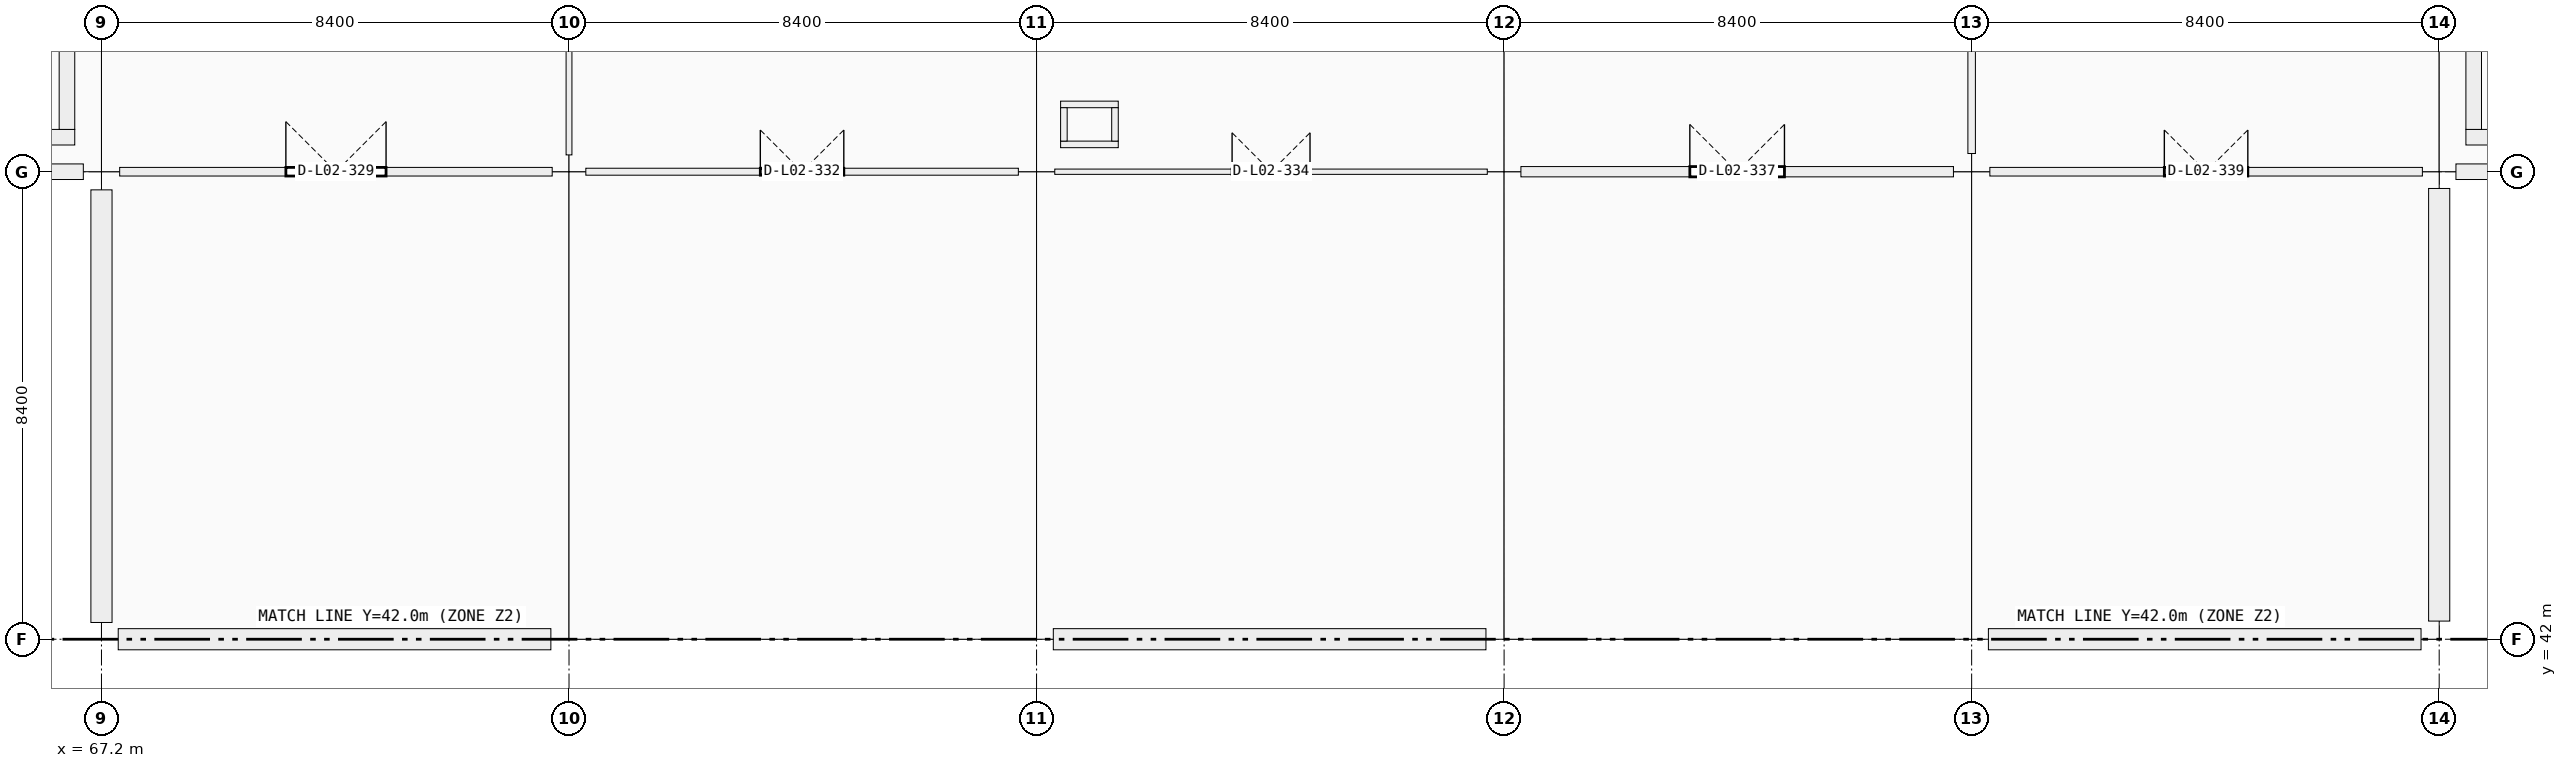
"""IFC4 building model, lengths in metres.
Left out: names, types, materials, properties, quantities, classifications, styles, units other than length and angle.
Written with IfcOpenShell. Run it as: python <this file> out.ifc"""

import sys

from ifc_helpers import new_model, si_unit, direction, frame, frame_2d, origin, origin_2d, place, context, subcontext, project, spatial, rectangle, extrude, element, fill, save


model = new_model("IFC4")
c1 = context("Model", 3, precision=1e-05, world=origin(), true_north=direction((0.0, 1.0)))
c2 = subcontext(c1, "Body", "Model", "MODEL_VIEW")
j1 = project(units=[si_unit("LENGTHUNIT", "METRE"), si_unit("PLANEANGLEUNIT", "RADIAN")], contexts=[c1])
p1 = place(None, origin())
s1 = spatial("IfcSite", under=j1, at=p1, CompositionType="ELEMENT")
p2 = place(p1, origin())
s2 = spatial("IfcBuilding", under=s1, at=p2, CompositionType="ELEMENT")
p3 = place(p2, frame((0.0, 0.0, 10.26)))
s3 = spatial("IfcBuildingStorey", under=s2, at=p3, CompositionType="ELEMENT", Elevation=10.26)
p4 = place(p3, frame((67.2, 42.0, 0.0), z_axis=(0.0, 0.0, 1.0), x_axis=(1.0, 0.0, 0.0)))
e1 = element("IfcColumn", 1, at=p4, inside=s3, PredefinedType="COLUMN", context=c2, shape_type="SweptSolid", body=[
    extrude(rectangle(XDim=0.6, YDim=0.6, at=origin_2d()), origin(), (0.0, 0.0, 1.0), 4.5),
])
for number, where, z_axis, x_axis in (
    (2, (67.2, 50.4, 0.0), (0.0, 0.0, 1.0), (1.0, 0.0, 0.0)),
    (3, (75.6, 42.0, 0.0), (0.0, 0.0, 1.0), (1.0, 0.0, 0.0)),
):
    element("IfcColumn", number, at=place(p3, frame(where, z_axis=z_axis, x_axis=x_axis)), inside=s3, PredefinedType="COLUMN", context=c2, shape_type="SweptSolid", body=[
        extrude(rectangle(XDim=0.65, YDim=0.65, at=origin_2d()), origin(), (0.0, 0.0, 1.0), 4.5),
    ])
for number, where, z_axis, x_axis in (
    (4, (75.6, 50.4, 0.0), (0.0, 0.0, 1.0), (1.0, 0.0, 0.0)),
    (5, (84.0, 42.0, 0.0), (0.0, 0.0, 1.0), (1.0, 0.0, 0.0)),
):
    element("IfcColumn", number, at=place(p3, frame(where, z_axis=z_axis, x_axis=x_axis)), inside=s3, PredefinedType="COLUMN", context=c2, shape_type="SweptSolid", body=[
        extrude(rectangle(XDim=0.6, YDim=0.6, at=origin_2d()), origin(), (0.0, 0.0, 1.0), 4.5),
    ])
for number, where, z_axis, x_axis in (
    (6, (84.0, 50.4, 0.0), (0.0, 0.0, 1.0), (1.0, 0.0, 0.0)),
    (7, (92.4, 42.0, 0.0), (0.0, 0.0, 1.0), (1.0, 0.0, 0.0)),
):
    element("IfcColumn", number, at=place(p3, frame(where, z_axis=z_axis, x_axis=x_axis)), inside=s3, PredefinedType="COLUMN", context=c2, shape_type="SweptSolid", body=[
        extrude(rectangle(XDim=0.65, YDim=0.65, at=origin_2d()), origin(), (0.0, 0.0, 1.0), 4.5),
    ])
for number, where, z_axis, x_axis in (
    (8, (92.4, 50.4, 0.0), (0.0, 0.0, 1.0), (1.0, 0.0, 0.0)),
    (9, (100.8, 42.0, 0.0), (0.0, 0.0, 1.0), (1.0, 0.0, 0.0)),
):
    element("IfcColumn", number, at=place(p3, frame(where, z_axis=z_axis, x_axis=x_axis)), inside=s3, PredefinedType="COLUMN", context=c2, shape_type="SweptSolid", body=[
        extrude(rectangle(XDim=0.6, YDim=0.6, at=origin_2d()), origin(), (0.0, 0.0, 1.0), 4.5),
    ])
for number, where, z_axis, x_axis in (
    (10, (100.8, 50.4, 0.0), (0.0, 0.0, 1.0), (1.0, 0.0, 0.0)),
    (11, (109.2, 42.0, 0.0), (0.0, 0.0, 1.0), (1.0, 0.0, 0.0)),
):
    element("IfcColumn", number, at=place(p3, frame(where, z_axis=z_axis, x_axis=x_axis)), inside=s3, PredefinedType="COLUMN", context=c2, shape_type="SweptSolid", body=[
        extrude(rectangle(XDim=0.65, YDim=0.65, at=origin_2d()), origin(), (0.0, 0.0, 1.0), 4.5),
    ])
p5 = place(p3, frame((109.2, 50.4, 0.0), z_axis=(0.0, 0.0, 1.0), x_axis=(1.0, 0.0, 0.0)))
e12 = element("IfcColumn", 12, at=p5, inside=s3, PredefinedType="COLUMN", context=c2, shape_type="SweptSolid", body=[
    extrude(rectangle(XDim=0.6, YDim=0.6, at=origin_2d()), origin(), (0.0, 0.0, 1.0), 4.5),
])
p6 = place(p3, frame((66.874, 50.4, 0.0), z_axis=(0.0, 0.0, 1.0), x_axis=(-1.0, 0.0, 0.0)))
e13 = element("IfcWall", 13, at=p6, inside=s3, PredefinedType="SOLIDWALL", context=c2, shape_type="SweptSolid", body=[
    extrude(rectangle(XDim=7.773, YDim=0.28, at=frame_2d((3.886, 0.0))), origin(), (0.0, 0.0, 1.0), 3.54),
])
p7 = place(p3, frame((75.274, 42.0, 0.0), z_axis=(0.0, 0.0, 1.0), x_axis=(-1.0, 0.0, 0.0)))
e14 = element("IfcWall", 14, at=p7, inside=s3, PredefinedType="SOLIDWALL", context=c2, shape_type="SweptSolid", body=[
    extrude(rectangle(XDim=7.773, YDim=0.38, at=frame_2d((3.886, 0.0))), origin(), (0.0, 0.0, 1.0), 3.54),
])
p8 = place(p7, frame((2.636, 0.0, 1.55)))
e15 = element("IfcOpeningElement", 15, at=p8, cuts=e14, PredefinedType="OPENING", context=c2, shape_type="SweptSolid", body=[
    extrude(rectangle(XDim=2.5, YDim=1.65, at=frame_2d((1.25, 0.825))), frame((0.0, 0.19, 0.0), z_axis=(0.0, -1.0, 0.0), x_axis=(1.0, 0.0, 0.0)), (0.0, 0.0, 1.0), 0.38),
])
p9 = place(p3, frame((67.2, 42.301, 0.0), z_axis=(0.0, 0.0, 1.0), x_axis=(0.0, 1.0, 0.0)))
e16 = element("IfcWall", 16, at=p9, inside=s3, PredefinedType="SOLIDWALL", context=c2, shape_type="SweptSolid", body=[
    extrude(rectangle(XDim=7.773, YDim=0.38, at=frame_2d((3.886, 0.0))), origin(), (0.0, 0.0, 1.0), 3.54),
])
p10 = place(p3, frame((92.074, 42.0, 0.0), z_axis=(0.0, 0.0, 1.0), x_axis=(-1.0, 0.0, 0.0)))
e17 = element("IfcWall", 17, at=p10, inside=s3, PredefinedType="SOLIDWALL", context=c2, shape_type="SweptSolid", body=[
    extrude(rectangle(XDim=7.773, YDim=0.38, at=frame_2d((3.886, 0.0))), origin(), (0.0, 0.0, 1.0), 3.54),
])
p11 = place(p10, frame((3.337, 0.0, 1.55)))
e18 = element("IfcOpeningElement", 18, at=p11, cuts=e17, PredefinedType="OPENING", context=c2, shape_type="SweptSolid", body=[
    extrude(rectangle(XDim=1.1, YDim=1.5, at=frame_2d((0.55, 0.75))), frame((0.0, 0.19, 0.0), z_axis=(0.0, -1.0, 0.0), x_axis=(1.0, 0.0, 0.0)), (0.0, 0.0, 1.0), 0.38),
])
p12 = place(p3, frame((108.874, 42.0, 0.0), z_axis=(0.0, 0.0, 1.0), x_axis=(-1.0, 0.0, 0.0)))
e19 = element("IfcWall", 19, at=p12, inside=s3, PredefinedType="SOLIDWALL", context=c2, shape_type="SweptSolid", body=[
    extrude(rectangle(XDim=7.773, YDim=0.38, at=frame_2d((3.886, 0.0))), origin(), (0.0, 0.0, 1.0), 3.54),
])
p13 = place(p3, frame((109.2, 50.099, 0.0), z_axis=(0.0, 0.0, 1.0), x_axis=(0.0, -1.0, 0.0)))
e20 = element("IfcWall", 20, at=p13, inside=s3, PredefinedType="SOLIDWALL", context=c2, shape_type="SweptSolid", body=[
    extrude(rectangle(XDim=7.773, YDim=0.38, at=frame_2d((3.887, 0.0))), origin(), (0.0, 0.0, 1.0), 3.54),
])
p14 = place(p3, frame((117.274, 50.4, 0.0), z_axis=(0.0, 0.0, 1.0), x_axis=(-1.0, 0.0, 0.0)))
e21 = element("IfcWall", 21, at=p14, inside=s3, PredefinedType="SOLIDWALL", context=c2, shape_type="SweptSolid", body=[
    extrude(rectangle(XDim=7.773, YDim=0.28, at=frame_2d((3.886, 0.0))), origin(), (0.0, 0.0, 1.0), 3.54),
])
p15 = place(p3, frame((66.72, 51.02, 0.0), z_axis=(0.0, 0.0, 1.0), x_axis=(-1.0, 0.0, 0.0)))
e22 = element("IfcWall", 22, at=p15, inside=s3, PredefinedType="SHEAR", context=c2, shape_type="SweptSolid", body=[
    extrude(rectangle(XDim=7.44, YDim=0.28, at=frame_2d((3.72, 0.0))), origin(), (0.0, 0.0, 1.0), 4.5),
])
p16 = place(p3, frame((66.58, 58.04, 0.0), z_axis=(0.0, 0.0, 1.0), x_axis=(0.0, -1.0, 0.0)))
e23 = element("IfcWall", 23, at=p16, inside=s3, PredefinedType="SHEAR", context=c2, shape_type="SweptSolid", body=[
    extrude(rectangle(XDim=6.88, YDim=0.28, at=frame_2d((3.44, 0.0))), origin(), (0.0, 0.0, 1.0), 4.5),
])
p17 = place(p16, frame((3.99, 0.0, 0.0)))
e24 = element("IfcOpeningElement", 24, at=p17, cuts=e23, PredefinedType="OPENING", context=c2, shape_type="SweptSolid", body=[
    extrude(rectangle(XDim=1.5, YDim=2.15, at=frame_2d((0.75, 1.075))), frame((0.0, 0.14, 0.0), z_axis=(0.0, -1.0, 0.0), x_axis=(1.0, 0.0, 0.0)), (0.0, 0.0, 1.0), 0.28),
])
p18 = place(p3, frame((117.12, 51.02, 0.0), z_axis=(0.0, 0.0, 1.0), x_axis=(-1.0, 0.0, 0.0)))
e25 = element("IfcWall", 25, at=p18, inside=s3, PredefinedType="SHEAR", context=c2, shape_type="SweptSolid", body=[
    extrude(rectangle(XDim=7.44, YDim=0.28, at=frame_2d((3.72, 0.0))), origin(), (0.0, 0.0, 1.0), 4.5),
])
p19 = place(p3, frame((109.82, 51.16, 0.0), z_axis=(0.0, 0.0, 1.0), x_axis=(0.0, 1.0, 0.0)))
e26 = element("IfcWall", 26, at=p19, inside=s3, PredefinedType="SHEAR", context=c2, shape_type="SweptSolid", body=[
    extrude(rectangle(XDim=6.88, YDim=0.28, at=frame_2d((3.44, 0.0))), origin(), (0.0, 0.0, 1.0), 4.5),
])
for number, where, z_axis, x_axis in (
    (27, (84.432, 50.891, 0.0), (0.0, 0.0, 1.0), (1.0, 0.0, 0.0)),
    (28, (84.432, 51.609, 0.0), (0.0, 0.0, 1.0), (1.0, 0.0, 0.0)),
):
    element("IfcWall", number, at=place(p3, frame(where, z_axis=z_axis, x_axis=x_axis)), inside=s3, PredefinedType="PARTITIONING", context=c2, shape_type="SweptSolid", body=[
        extrude(rectangle(XDim=1.036, YDim=0.118, at=frame_2d((0.518, 0.0))), origin(), (0.0, 0.0, 1.0), 3.53),
    ])
for number, where, z_axis, x_axis in (
    (29, (84.491, 50.95, 0.0), (0.0, 0.0, 1.0), (0.0, 1.0, 0.0)),
    (30, (85.409, 50.95, 0.0), (0.0, 0.0, 1.0), (0.0, 1.0, 0.0)),
):
    element("IfcWall", number, at=place(p3, frame(where, z_axis=z_axis, x_axis=x_axis)), inside=s3, PredefinedType="PARTITIONING", context=c2, shape_type="SweptSolid", body=[
        extrude(rectangle(XDim=0.6, YDim=0.118, at=frame_2d((0.3, 0.0))), origin(), (0.0, 0.0, 1.0), 3.53),
    ])
p20 = place(p3, frame((67.527, 50.4, 0.0), z_axis=(0.0, 0.0, 1.0), x_axis=(1.0, 0.0, 0.0)))
e31 = element("IfcWall", 31, at=p20, inside=s3, PredefinedType="PARTITIONING", context=c2, shape_type="SweptSolid", body=[
    extrude(rectangle(XDim=7.771, YDim=0.155, at=frame_2d((3.885, 0.0))), origin(), (0.0, 0.0, 1.0), 3.37),
])
p21 = place(p20, frame((2.986, 0.0, 0.0)))
e32 = element("IfcOpeningElement", 32, at=p21, cuts=e31, PredefinedType="OPENING", context=c2, shape_type="SweptSolid", body=[
    extrude(rectangle(XDim=1.8, YDim=2.4, at=frame_2d((0.9, 1.2))), frame((0.0, 0.078, 0.0), z_axis=(0.0, -1.0, 0.0), x_axis=(1.0, 0.0, 0.0)), (0.0, 0.0, 1.0), 0.155),
])
p22 = place(p3, frame((75.902, 50.4, 0.0), z_axis=(0.0, 0.0, 1.0), x_axis=(1.0, 0.0, 0.0)))
e33 = element("IfcWall", 33, at=p22, inside=s3, PredefinedType="PARTITIONING", context=c2, shape_type="SweptSolid", body=[
    extrude(rectangle(XDim=7.771, YDim=0.125, at=frame_2d((3.885, 0.0))), origin(), (0.0, 0.0, 1.0), 3.37),
])
p23 = place(p22, frame((3.135, 0.0, 0.0)))
e34 = element("IfcOpeningElement", 34, at=p23, cuts=e33, PredefinedType="OPENING", context=c2, shape_type="SweptSolid", body=[
    extrude(rectangle(XDim=1.5, YDim=2.25, at=frame_2d((0.75, 1.125))), frame((0.0, 0.062, 0.0), z_axis=(0.0, -1.0, 0.0), x_axis=(1.0, 0.0, 0.0)), (0.0, 0.0, 1.0), 0.125),
])
p24 = place(p3, frame((84.327, 50.4, 0.0), z_axis=(0.0, 0.0, 1.0), x_axis=(1.0, 0.0, 0.0)))
e35 = element("IfcWall", 35, at=p24, inside=s3, PredefinedType="PARTITIONING", context=c2, shape_type="SweptSolid", body=[
    extrude(rectangle(XDim=7.771, YDim=0.095, at=frame_2d((3.885, 0.0))), origin(), (0.0, 0.0, 1.0), 3.37),
])
p25 = place(p24, frame((3.186, 0.0, 0.0)))
e36 = element("IfcOpeningElement", 36, at=p25, cuts=e35, PredefinedType="OPENING", context=c2, shape_type="SweptSolid", body=[
    extrude(rectangle(XDim=1.4, YDim=2.25, at=frame_2d((0.7, 1.125))), frame((0.0, 0.047, 0.0), z_axis=(0.0, -1.0, 0.0), x_axis=(1.0, 0.0, 0.0)), (0.0, 0.0, 1.0), 0.095),
])
p26 = place(p3, frame((92.702, 50.4, 0.0), z_axis=(0.0, 0.0, 1.0), x_axis=(1.0, 0.0, 0.0)))
e37 = element("IfcWall", 37, at=p26, inside=s3, PredefinedType="PARTITIONING", context=c2, shape_type="SweptSolid", body=[
    extrude(rectangle(XDim=7.771, YDim=0.185, at=frame_2d((3.885, 0.0))), origin(), (0.0, 0.0, 1.0), 3.37),
])
p27 = place(p26, frame((3.035, 0.0, 0.0)))
e38 = element("IfcOpeningElement", 38, at=p27, cuts=e37, PredefinedType="OPENING", context=c2, shape_type="SweptSolid", body=[
    extrude(rectangle(XDim=1.7, YDim=2.35, at=frame_2d((0.85, 1.175))), frame((0.0, 0.093, 0.0), z_axis=(0.0, -1.0, 0.0), x_axis=(1.0, 0.0, 0.0)), (0.0, 0.0, 1.0), 0.185),
])
p28 = place(p3, frame((101.127, 50.4, 0.0), z_axis=(0.0, 0.0, 1.0), x_axis=(1.0, 0.0, 0.0)))
e39 = element("IfcWall", 39, at=p28, inside=s3, PredefinedType="PARTITIONING", context=c2, shape_type="SweptSolid", body=[
    extrude(rectangle(XDim=7.771, YDim=0.155, at=frame_2d((3.885, 0.0))), origin(), (0.0, 0.0, 1.0), 3.37),
])
p29 = place(p28, frame((3.135, 0.0, 0.0)))
e40 = element("IfcOpeningElement", 40, at=p29, cuts=e39, PredefinedType="OPENING", context=c2, shape_type="SweptSolid", body=[
    extrude(rectangle(XDim=1.5, YDim=2.25, at=frame_2d((0.75, 1.125))), frame((0.0, 0.078, 0.0), z_axis=(0.0, -1.0, 0.0), x_axis=(1.0, 0.0, 0.0)), (0.0, 0.0, 1.0), 0.155),
])
p30 = place(p3, frame((75.6, 50.702, 0.0), z_axis=(0.0, 0.0, 1.0), x_axis=(0.0, 1.0, 0.0)))
e41 = element("IfcWall", 41, at=p30, inside=s3, PredefinedType="PARTITIONING", context=c2, shape_type="SweptSolid", body=[
    extrude(rectangle(XDim=7.771, YDim=0.105, at=frame_2d((3.885, 0.0))), origin(), (0.0, 0.0, 1.0), 3.37),
])
p31 = place(p30, frame((3.21, 0.0, 0.0)))
e42 = element("IfcOpeningElement", 42, at=p31, cuts=e41, PredefinedType="OPENING", context=c2, shape_type="SweptSolid", body=[
    extrude(rectangle(XDim=1.35, YDim=2.2, at=frame_2d((0.675, 1.1))), frame((0.0, 0.052, 0.0), z_axis=(0.0, -1.0, 0.0), x_axis=(1.0, 0.0, 0.0)), (0.0, 0.0, 1.0), 0.105),
])
p32 = place(p3, frame((100.8, 50.727, 0.0), z_axis=(0.0, 0.0, 1.0), x_axis=(0.0, 1.0, 0.0)))
e43 = element("IfcWall", 43, at=p32, inside=s3, PredefinedType="PARTITIONING", context=c2, shape_type="SweptSolid", body=[
    extrude(rectangle(XDim=7.771, YDim=0.135, at=frame_2d((3.885, 0.0))), origin(), (0.0, 0.0, 1.0), 3.37),
])
p33 = place(p32, frame((3.035, 0.0, 0.0)))
e44 = element("IfcOpeningElement", 44, at=p33, cuts=e43, PredefinedType="OPENING", context=c2, shape_type="SweptSolid", body=[
    extrude(rectangle(XDim=1.7, YDim=2.35, at=frame_2d((0.85, 1.175))), frame((0.0, 0.067, 0.0), z_axis=(0.0, -1.0, 0.0), x_axis=(1.0, 0.0, 0.0)), (0.0, 0.0, 1.0), 0.135),
])
p34 = place(p8, origin())
e45 = element("IfcWindow", 45, at=p34, inside=s3, PartitioningType="SINGLE_PANEL", PredefinedType="WINDOW", context=c2, shape_type="SweptSolid", body=[
    extrude(rectangle(XDim=2.5, YDim=1.65, at=frame_2d((1.25, 0.825))), frame((0.0, 0.03, 0.0), z_axis=(0.0, -1.0, 0.0), x_axis=(1.0, 0.0, 0.0)), (0.0, 0.0, 1.0), 0.06),
])
fill(e15, e45)
p35 = place(p11, origin())
e46 = element("IfcWindow", 46, at=p35, inside=s3, PartitioningType="SINGLE_PANEL", PredefinedType="WINDOW", context=c2, shape_type="SweptSolid", body=[
    extrude(rectangle(XDim=1.1, YDim=1.5, at=frame_2d((0.55, 0.75))), frame((0.0, 0.03, 0.0), z_axis=(0.0, -1.0, 0.0), x_axis=(1.0, 0.0, 0.0)), (0.0, 0.0, 1.0), 0.06),
])
fill(e18, e46)
p36 = place(p21, origin())
e47 = element("IfcDoor", 47, at=p36, inside=s3, OperationType="DOUBLE_DOOR_SINGLE_SWING", PredefinedType="DOOR", context=c2, shape_type="SweptSolid", body=[
    extrude(rectangle(XDim=1.8, YDim=2.4, at=frame_2d((0.9, 1.2))), frame((0.0, 0.025, 0.0), z_axis=(0.0, -1.0, 0.0), x_axis=(1.0, 0.0, 0.0)), (0.0, 0.0, 1.0), 0.05),
])
fill(e32, e47)
p37 = place(p23, origin())
e48 = element("IfcDoor", 48, at=p37, inside=s3, OperationType="DOUBLE_DOOR_SINGLE_SWING", PredefinedType="DOOR", context=c2, shape_type="SweptSolid", body=[
    extrude(rectangle(XDim=1.5, YDim=2.25, at=frame_2d((0.75, 1.125))), frame((0.0, 0.025, 0.0), z_axis=(0.0, -1.0, 0.0), x_axis=(1.0, 0.0, 0.0)), (0.0, 0.0, 1.0), 0.05),
])
fill(e34, e48)
p38 = place(p25, origin())
e49 = element("IfcDoor", 49, at=p38, inside=s3, OperationType="DOUBLE_DOOR_SINGLE_SWING", PredefinedType="DOOR", context=c2, shape_type="SweptSolid", body=[
    extrude(rectangle(XDim=1.4, YDim=2.25, at=frame_2d((0.7, 1.125))), frame((0.0, 0.025, 0.0), z_axis=(0.0, -1.0, 0.0), x_axis=(1.0, 0.0, 0.0)), (0.0, 0.0, 1.0), 0.05),
])
fill(e36, e49)
p39 = place(p27, origin())
e50 = element("IfcDoor", 50, at=p39, inside=s3, OperationType="DOUBLE_DOOR_SINGLE_SWING", PredefinedType="DOOR", context=c2, shape_type="SweptSolid", body=[
    extrude(rectangle(XDim=1.7, YDim=2.35, at=frame_2d((0.85, 1.175))), frame((0.0, 0.025, 0.0), z_axis=(0.0, -1.0, 0.0), x_axis=(1.0, 0.0, 0.0)), (0.0, 0.0, 1.0), 0.05),
])
fill(e38, e50)
p40 = place(p29, origin())
e51 = element("IfcDoor", 51, at=p40, inside=s3, OperationType="DOUBLE_DOOR_SINGLE_SWING", PredefinedType="DOOR", context=c2, shape_type="SweptSolid", body=[
    extrude(rectangle(XDim=1.5, YDim=2.25, at=frame_2d((0.75, 1.125))), frame((0.0, 0.025, 0.0), z_axis=(0.0, -1.0, 0.0), x_axis=(1.0, 0.0, 0.0)), (0.0, 0.0, 1.0), 0.05),
])
fill(e40, e51)
save(model, sys.argv[1])
